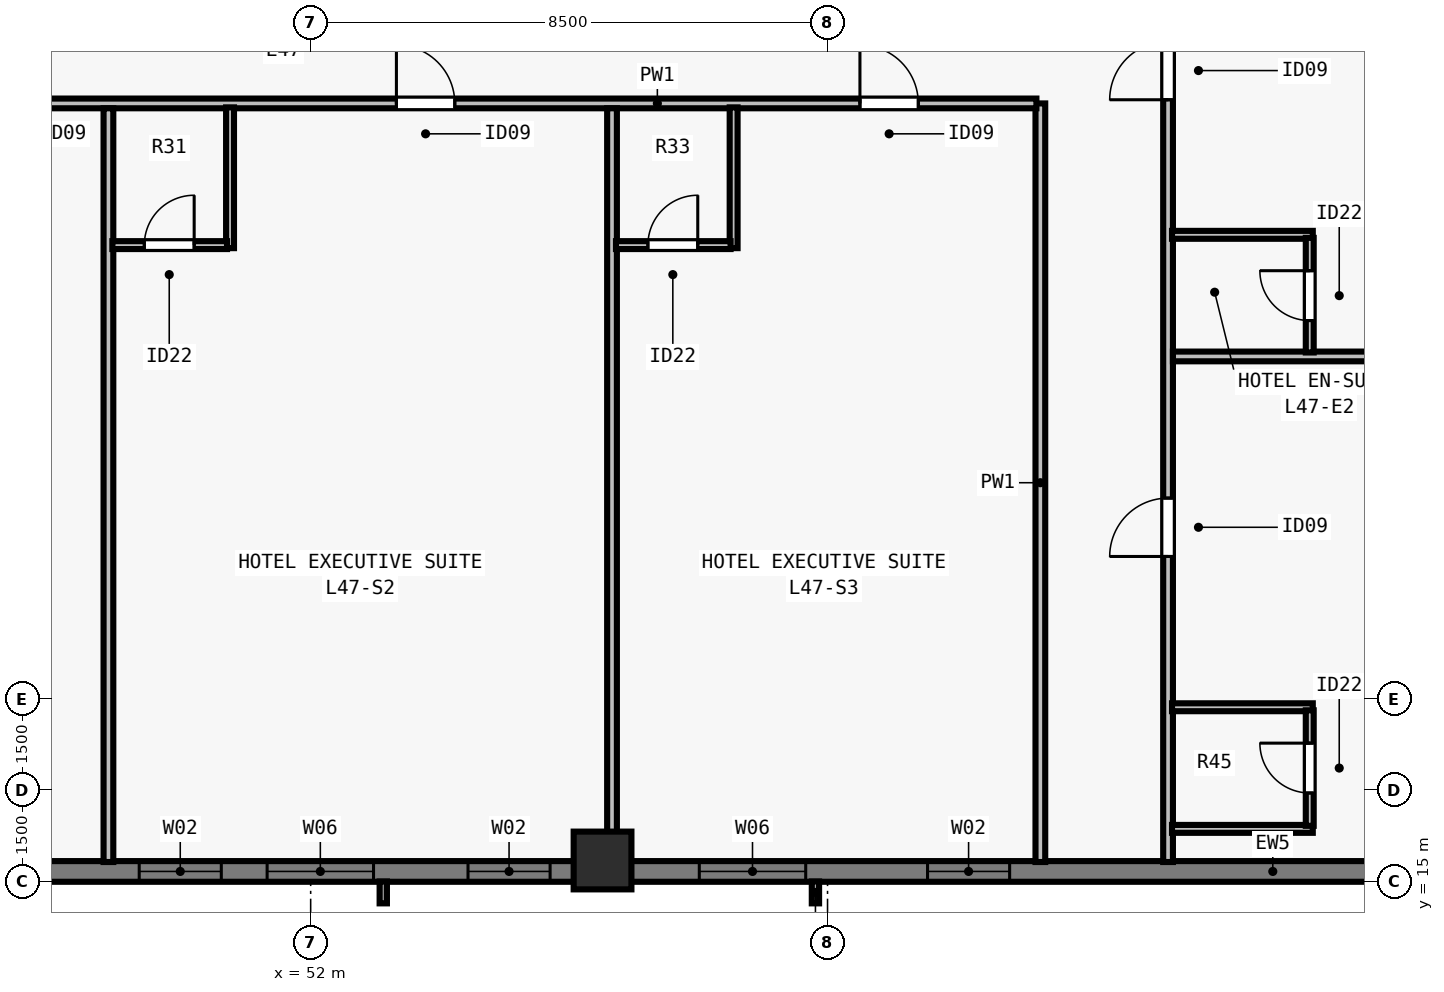
"""IFC4 building model, lengths in metres.
Left out: names, types, materials, properties, quantities, classifications, styles, units other than length and angle.
Written with IfcOpenShell. Run it as: python <this file> out.ifc"""

import sys

from ifc_helpers import new_model, si_unit, direction, frame, frame_2d, origin, origin_2d, place, context, subcontext, project, spatial, rectangle, extrude, element, fill, save


model = new_model("IFC4")
c1 = context("Model", 3, precision=1e-05, world=origin(), true_north=direction((0.0, 1.0)))
c2 = subcontext(c1, "Body", "Model", "MODEL_VIEW")
j1 = project(units=[si_unit("LENGTHUNIT", "METRE"), si_unit("PLANEANGLEUNIT", "RADIAN")], contexts=[c1])
p1 = place(None, origin())
s1 = spatial("IfcSite", under=j1, at=p1, CompositionType="ELEMENT")
p2 = place(p1, origin())
s2 = spatial("IfcBuilding", under=s1, at=p2, CompositionType="ELEMENT")
p3 = place(p2, frame((0.0, 0.0, 172.5)))
s3 = spatial("IfcBuildingStorey", under=s2, at=p3, CompositionType="ELEMENT", Elevation=172.5)
p4 = place(p3, frame((56.8, 15.35, 0.0), z_axis=(0.0, 0.0, 1.0), x_axis=(1.0, 0.0, 0.0)))
e1 = element("IfcColumn", 1, at=p4, inside=s3, PredefinedType="COLUMN", context=c2, shape_type="SweptSolid", body=[
    extrude(rectangle(XDim=0.95, YDim=0.95, at=origin_2d()), origin(), (0.0, 0.0, 1.0), 3.5),
])
p5 = place(p3, frame((72.0, 15.17, 0.0), z_axis=(0.0, 0.0, 1.0), x_axis=(-1.0, 0.0, 0.0)))
e2 = element("IfcWall", 2, at=p5, inside=s3, PredefinedType="SOLIDWALL", context=c2, shape_type="SweptSolid", body=[
    extrude(rectangle(XDim=39.682, YDim=0.34, at=frame_2d((19.841, 0.0))), origin(), (0.0, 0.0, 1.0), 3.28),
])
p6 = place(p5, frame((8.505, 0.0, 0.8)))
e3 = element("IfcOpeningElement", 3, at=p6, cuts=e2, PredefinedType="OPENING", context=c2, shape_type="SweptSolid", body=[
    extrude(rectangle(XDim=1.35, YDim=1.66, at=frame_2d((0.675, 0.83))), frame((0.0, 0.18, 0.0), z_axis=(0.0, -1.0, 0.0), x_axis=(1.0, 0.0, 0.0)), (0.0, 0.0, 1.0), 0.36),
])
p7 = place(p5, frame((11.859, 0.0, 0.8)))
e4 = element("IfcOpeningElement", 4, at=p7, cuts=e2, PredefinedType="OPENING", context=c2, shape_type="SweptSolid", body=[
    extrude(rectangle(XDim=1.75, YDim=1.66, at=frame_2d((0.875, 0.83))), frame((0.0, 0.18, 0.0), z_axis=(0.0, -1.0, 0.0), x_axis=(1.0, 0.0, 0.0)), (0.0, 0.0, 1.0), 0.36),
])
p8 = place(p5, frame((16.062, 0.0, 0.8)))
e5 = element("IfcOpeningElement", 5, at=p8, cuts=e2, PredefinedType="OPENING", context=c2, shape_type="SweptSolid", body=[
    extrude(rectangle(XDim=1.35, YDim=1.66, at=frame_2d((0.675, 0.83))), frame((0.0, 0.18, 0.0), z_axis=(0.0, -1.0, 0.0), x_axis=(1.0, 0.0, 0.0)), (0.0, 0.0, 1.0), 0.36),
])
p9 = place(p5, frame((18.966, 0.0, 0.8)))
e6 = element("IfcOpeningElement", 6, at=p9, cuts=e2, PredefinedType="OPENING", context=c2, shape_type="SweptSolid", body=[
    extrude(rectangle(XDim=1.75, YDim=1.66, at=frame_2d((0.875, 0.83))), frame((0.0, 0.18, 0.0), z_axis=(0.0, -1.0, 0.0), x_axis=(1.0, 0.0, 0.0)), (0.0, 0.0, 1.0), 0.36),
])
p10 = place(p5, frame((21.469, 0.0, 0.8)))
e7 = element("IfcOpeningElement", 7, at=p10, cuts=e2, PredefinedType="OPENING", context=c2, shape_type="SweptSolid", body=[
    extrude(rectangle(XDim=1.35, YDim=1.66, at=frame_2d((0.675, 0.83))), frame((0.0, 0.18, 0.0), z_axis=(0.0, -1.0, 0.0), x_axis=(1.0, 0.0, 0.0)), (0.0, 0.0, 1.0), 0.36),
])
p11 = place(p5, frame((26.073, 0.0, 0.8)))
e8 = element("IfcOpeningElement", 8, at=p11, cuts=e2, PredefinedType="OPENING", context=c2, shape_type="SweptSolid", body=[
    extrude(rectangle(XDim=1.75, YDim=1.66, at=frame_2d((0.875, 0.83))), frame((0.0, 0.18, 0.0), z_axis=(0.0, -1.0, 0.0), x_axis=(1.0, 0.0, 0.0)), (0.0, 0.0, 1.0), 0.36),
])
p12 = place(p5, frame((32.71, 0.0, 0.8)))
e9 = element("IfcOpeningElement", 9, at=p12, cuts=e2, PredefinedType="OPENING", context=c2, shape_type="SweptSolid", body=[
    extrude(rectangle(XDim=0.9, YDim=1.66, at=frame_2d((0.45, 0.83))), frame((0.0, 0.18, 0.0), z_axis=(0.0, -1.0, 0.0), x_axis=(1.0, 0.0, 0.0)), (0.0, 0.0, 1.0), 0.36),
])
p13 = place(p3, frame((66.1, 15.325, 0.0), z_axis=(0.0, 0.0, 1.0), x_axis=(0.0, 1.0, 0.0)))
e10 = element("IfcWall", 10, at=p13, inside=s3, PredefinedType="PARTITIONING", context=c2, shape_type="SweptSolid", body=[
    extrude(rectangle(XDim=47.35, YDim=0.16, at=frame_2d((23.675, 0.0))), origin(), (0.0, 0.0, 1.0), 2.555),
])
p14 = place(p13, frame((5.025, 0.0, 0.0)))
e11 = element("IfcOpeningElement", 11, at=p14, cuts=e10, PredefinedType="OPENING", context=c2, shape_type="SweptSolid", body=[
    extrude(rectangle(XDim=0.96, YDim=2.15, at=frame_2d((0.48, 1.075))), frame((0.0, 0.09, 0.0), z_axis=(0.0, -1.0, 0.0), x_axis=(1.0, 0.0, 0.0)), (0.0, 0.0, 1.0), 0.18),
])
p15 = place(p13, frame((12.535, 0.0, 0.0)))
e12 = element("IfcOpeningElement", 12, at=p15, cuts=e10, PredefinedType="OPENING", context=c2, shape_type="SweptSolid", body=[
    extrude(rectangle(XDim=0.96, YDim=2.15, at=frame_2d((0.48, 1.075))), frame((0.0, 0.09, 0.0), z_axis=(0.0, -1.0, 0.0), x_axis=(1.0, 0.0, 0.0)), (0.0, 0.0, 1.0), 0.18),
])
p16 = place(p13, frame((20.395, 0.0, 0.0)))
e13 = element("IfcOpeningElement", 13, at=p16, cuts=e10, PredefinedType="OPENING", context=c2, shape_type="SweptSolid", body=[
    extrude(rectangle(XDim=0.96, YDim=2.15, at=frame_2d((0.48, 1.075))), frame((0.0, 0.09, 0.0), z_axis=(0.0, -1.0, 0.0), x_axis=(1.0, 0.0, 0.0)), (0.0, 0.0, 1.0), 0.18),
])
p17 = place(p13, frame((28.255, 0.0, 0.0)))
e14 = element("IfcOpeningElement", 14, at=p17, cuts=e10, PredefinedType="OPENING", context=c2, shape_type="SweptSolid", body=[
    extrude(rectangle(XDim=0.96, YDim=2.15, at=frame_2d((0.48, 1.075))), frame((0.0, 0.09, 0.0), z_axis=(0.0, -1.0, 0.0), x_axis=(1.0, 0.0, 0.0)), (0.0, 0.0, 1.0), 0.18),
])
p18 = place(p13, frame((36.115, 0.0, 0.0)))
e15 = element("IfcOpeningElement", 15, at=p18, cuts=e10, PredefinedType="OPENING", context=c2, shape_type="SweptSolid", body=[
    extrude(rectangle(XDim=0.96, YDim=2.15, at=frame_2d((0.48, 1.075))), frame((0.0, 0.09, 0.0), z_axis=(0.0, -1.0, 0.0), x_axis=(1.0, 0.0, 0.0)), (0.0, 0.0, 1.0), 0.18),
])
p19 = place(p13, frame((44.1, 0.0, 0.0)))
e16 = element("IfcOpeningElement", 16, at=p19, cuts=e10, PredefinedType="OPENING", context=c2, shape_type="SweptSolid", body=[
    extrude(rectangle(XDim=0.96, YDim=2.15, at=frame_2d((0.48, 1.075))), frame((0.0, 0.09, 0.0), z_axis=(0.0, -1.0, 0.0), x_axis=(1.0, 0.0, 0.0)), (0.0, 0.0, 1.0), 0.18),
])
p20 = place(p3, frame((64.0, 15.325, 0.0), z_axis=(0.0, 0.0, 1.0), x_axis=(0.0, 1.0, 0.0)))
e17 = element("IfcWall", 17, at=p20, inside=s3, PredefinedType="PARTITIONING", context=c2, shape_type="SweptSolid", body=[
    extrude(rectangle(XDim=12.475, YDim=0.16, at=frame_2d((6.238, 0.0))), origin(), (0.0, 0.0, 1.0), 2.555),
])
p21 = place(p3, frame((41.865, 27.8, 0.0), z_axis=(0.0, 0.0, 1.0), x_axis=(1.0, 0.0, 0.0)))
e18 = element("IfcWall", 18, at=p21, inside=s3, PredefinedType="PARTITIONING", context=c2, shape_type="SweptSolid", body=[
    extrude(rectangle(XDim=22.07, YDim=0.16, at=frame_2d((11.035, 0.0))), origin(), (0.0, 0.0, 1.0), 3.28),
])
p22 = place(p21, frame((4.232, 0.0, 0.0)))
e19 = element("IfcOpeningElement", 19, at=p22, cuts=e18, PredefinedType="OPENING", context=c2, shape_type="SweptSolid", body=[
    extrude(rectangle(XDim=0.96, YDim=2.15, at=frame_2d((0.48, 1.075))), frame((0.0, 0.09, 0.0), z_axis=(0.0, -1.0, 0.0), x_axis=(1.0, 0.0, 0.0)), (0.0, 0.0, 1.0), 0.18),
])
p23 = place(p21, frame((11.545, 0.0, 0.0)))
e20 = element("IfcOpeningElement", 20, at=p23, cuts=e18, PredefinedType="OPENING", context=c2, shape_type="SweptSolid", body=[
    extrude(rectangle(XDim=0.96, YDim=2.15, at=frame_2d((0.48, 1.075))), frame((0.0, 0.09, 0.0), z_axis=(0.0, -1.0, 0.0), x_axis=(1.0, 0.0, 0.0)), (0.0, 0.0, 1.0), 0.18),
])
p24 = place(p21, frame((19.168, 0.0, 0.0)))
e21 = element("IfcOpeningElement", 21, at=p24, cuts=e18, PredefinedType="OPENING", context=c2, shape_type="SweptSolid", body=[
    extrude(rectangle(XDim=0.96, YDim=2.15, at=frame_2d((0.48, 1.075))), frame((0.0, 0.09, 0.0), z_axis=(0.0, -1.0, 0.0), x_axis=(1.0, 0.0, 0.0)), (0.0, 0.0, 1.0), 0.18),
])
p25 = place(p3, frame((48.674, 15.325, 0.0), z_axis=(0.0, 0.0, 1.0), x_axis=(0.0, 1.0, 0.0)))
e22 = element("IfcWall", 22, at=p25, inside=s3, PredefinedType="PARTITIONING", context=c2, shape_type="SweptSolid", body=[
    extrude(rectangle(XDim=12.395, YDim=0.16, at=frame_2d((6.198, 0.0))), origin(), (0.0, 0.0, 1.0), 2.896),
])
p26 = place(p3, frame((50.674, 25.42, 0.0), z_axis=(0.0, 0.0, 1.0), x_axis=(0.0, 1.0, 0.0)))
e23 = element("IfcWall", 23, at=p26, inside=s3, PredefinedType="PLUMBINGWALL", context=c2, shape_type="SweptSolid", body=[
    extrude(rectangle(XDim=2.315, YDim=0.13, at=frame_2d((1.158, 0.0))), origin(), (0.0, 0.0, 1.0), 3.28),
])
p27 = place(p3, frame((48.739, 25.47, 0.0), z_axis=(0.0, 0.0, 1.0), x_axis=(1.0, 0.0, 0.0)))
e24 = element("IfcWall", 24, at=p27, inside=s3, PredefinedType="PLUMBINGWALL", context=c2, shape_type="SweptSolid", body=[
    extrude(rectangle(XDim=1.885, YDim=0.13, at=frame_2d((0.942, 0.0))), origin(), (0.0, 0.0, 1.0), 3.28),
])
p28 = place(p27, frame((0.525, 0.0, 0.0)))
e25 = element("IfcOpeningElement", 25, at=p28, cuts=e24, PredefinedType="OPENING", context=c2, shape_type="SweptSolid", body=[
    extrude(rectangle(XDim=0.82, YDim=2.1, at=frame_2d((0.41, 1.05))), frame((0.0, 0.075, 0.0), z_axis=(0.0, -1.0, 0.0), x_axis=(1.0, 0.0, 0.0)), (0.0, 0.0, 1.0), 0.15),
])
p29 = place(p3, frame((56.956, 15.325, 0.0), z_axis=(0.0, 0.0, 1.0), x_axis=(0.0, 1.0, 0.0)))
e26 = element("IfcWall", 26, at=p29, inside=s3, PredefinedType="PARTITIONING", context=c2, shape_type="SweptSolid", body=[
    extrude(rectangle(XDim=12.395, YDim=0.16, at=frame_2d((6.198, 0.0))), origin(), (0.0, 0.0, 1.0), 2.555),
])
p30 = place(p3, frame((58.956, 25.42, 0.0), z_axis=(0.0, 0.0, 1.0), x_axis=(0.0, 1.0, 0.0)))
e27 = element("IfcWall", 27, at=p30, inside=s3, PredefinedType="PLUMBINGWALL", context=c2, shape_type="SweptSolid", body=[
    extrude(rectangle(XDim=2.315, YDim=0.13, at=frame_2d((1.158, 0.0))), origin(), (0.0, 0.0, 1.0), 3.28),
])
p31 = place(p3, frame((57.021, 25.47, 0.0), z_axis=(0.0, 0.0, 1.0), x_axis=(1.0, 0.0, 0.0)))
e28 = element("IfcWall", 28, at=p31, inside=s3, PredefinedType="PLUMBINGWALL", context=c2, shape_type="SweptSolid", body=[
    extrude(rectangle(XDim=1.885, YDim=0.13, at=frame_2d((0.942, 0.0))), origin(), (0.0, 0.0, 1.0), 3.28),
])
p32 = place(p31, frame((0.525, 0.0, 0.0)))
e29 = element("IfcOpeningElement", 29, at=p32, cuts=e28, PredefinedType="OPENING", context=c2, shape_type="SweptSolid", body=[
    extrude(rectangle(XDim=0.82, YDim=2.1, at=frame_2d((0.41, 1.05))), frame((0.0, 0.075, 0.0), z_axis=(0.0, -1.0, 0.0), x_axis=(1.0, 0.0, 0.0)), (0.0, 0.0, 1.0), 0.15),
])
for number, where, z_axis, x_axis in (
    (30, (66.165, 15.87, 0.0), (0.0, 0.0, 1.0), (1.0, 0.0, 0.0)),
    (31, (66.165, 17.87, 0.0), (0.0, 0.0, 1.0), (1.0, 0.0, 0.0)),
):
    element("IfcWall", number, at=place(p3, frame(where, z_axis=z_axis, x_axis=x_axis)), inside=s3, PredefinedType="PLUMBINGWALL", context=c2, shape_type="SweptSolid", body=[
        extrude(rectangle(XDim=2.315, YDim=0.13, at=frame_2d((1.157, 0.0))), origin(), (0.0, 0.0, 1.0), 3.28),
    ])
p33 = place(p3, frame((68.43, 15.92, 0.0), z_axis=(0.0, 0.0, 1.0), x_axis=(0.0, 1.0, 0.0)))
e32 = element("IfcWall", 32, at=p33, inside=s3, PredefinedType="PLUMBINGWALL", context=c2, shape_type="SweptSolid", body=[
    extrude(rectangle(XDim=1.9, YDim=0.13, at=frame_2d((0.95, 0.0))), origin(), (0.0, 0.0, 1.0), 3.28),
])
p34 = place(p33, frame((0.54, 0.0, 0.0)))
e33 = element("IfcOpeningElement", 33, at=p34, cuts=e32, PredefinedType="OPENING", context=c2, shape_type="SweptSolid", body=[
    extrude(rectangle(XDim=0.82, YDim=2.1, at=frame_2d((0.41, 1.05))), frame((0.0, 0.075, 0.0), z_axis=(0.0, -1.0, 0.0), x_axis=(1.0, 0.0, 0.0)), (0.0, 0.0, 1.0), 0.15),
])
p35 = place(p3, frame((66.18, 23.639, 0.0), z_axis=(0.0, 0.0, 1.0), x_axis=(1.0, 0.0, 0.0)))
e34 = element("IfcWall", 34, at=p35, inside=s3, PredefinedType="PARTITIONING", context=c2, shape_type="SweptSolid", body=[
    extrude(rectangle(XDim=9.495, YDim=0.16, at=frame_2d((4.748, 0.0))), origin(), (0.0, 0.0, 1.0), 2.896),
])
p36 = place(p3, frame((66.165, 25.639, 0.0), z_axis=(0.0, 0.0, 1.0), x_axis=(1.0, 0.0, 0.0)))
e35 = element("IfcWall", 35, at=p36, inside=s3, PredefinedType="PLUMBINGWALL", context=c2, shape_type="SweptSolid", body=[
    extrude(rectangle(XDim=2.315, YDim=0.13, at=frame_2d((1.157, 0.0))), origin(), (0.0, 0.0, 1.0), 2.896),
])
p37 = place(p3, frame((68.43, 23.704, 0.0), z_axis=(0.0, 0.0, 1.0), x_axis=(0.0, 1.0, 0.0)))
e36 = element("IfcWall", 36, at=p37, inside=s3, PredefinedType="PLUMBINGWALL", context=c2, shape_type="SweptSolid", body=[
    extrude(rectangle(XDim=1.885, YDim=0.13, at=frame_2d((0.942, 0.0))), origin(), (0.0, 0.0, 1.0), 3.28),
])
p38 = place(p37, frame((0.525, 0.0, 0.0)))
e37 = element("IfcOpeningElement", 37, at=p38, cuts=e36, PredefinedType="OPENING", context=c2, shape_type="SweptSolid", body=[
    extrude(rectangle(XDim=0.82, YDim=2.1, at=frame_2d((0.41, 1.05))), frame((0.0, 0.075, 0.0), z_axis=(0.0, -1.0, 0.0), x_axis=(1.0, 0.0, 0.0)), (0.0, 0.0, 1.0), 0.15),
])
p39 = place(p6, origin())
e38 = element("IfcWindow", 38, at=p39, inside=s3, PartitioningType="SINGLE_PANEL", PredefinedType="WINDOW", context=c2, shape_type="SweptSolid", body=[
    extrude(rectangle(XDim=1.35, YDim=1.66, at=frame_2d((0.675, 0.83))), frame((0.0, -0.05, 0.0), z_axis=(0.0, -1.0, 0.0), x_axis=(1.0, 0.0, 0.0)), (0.0, 0.0, 1.0), 0.06),
])
fill(e3, e38)
p40 = place(p7, origin())
e39 = element("IfcWindow", 39, at=p40, inside=s3, PartitioningType="SINGLE_PANEL", PredefinedType="WINDOW", context=c2, shape_type="SweptSolid", body=[
    extrude(rectangle(XDim=1.75, YDim=1.66, at=frame_2d((0.875, 0.83))), frame((0.0, -0.05, 0.0), z_axis=(0.0, -1.0, 0.0), x_axis=(1.0, 0.0, 0.0)), (0.0, 0.0, 1.0), 0.06),
])
fill(e4, e39)
p41 = place(p8, origin())
e40 = element("IfcWindow", 40, at=p41, inside=s3, PartitioningType="SINGLE_PANEL", PredefinedType="WINDOW", context=c2, shape_type="SweptSolid", body=[
    extrude(rectangle(XDim=1.35, YDim=1.66, at=frame_2d((0.675, 0.83))), frame((0.0, -0.05, 0.0), z_axis=(0.0, -1.0, 0.0), x_axis=(1.0, 0.0, 0.0)), (0.0, 0.0, 1.0), 0.06),
])
fill(e5, e40)
p42 = place(p9, origin())
e41 = element("IfcWindow", 41, at=p42, inside=s3, PartitioningType="SINGLE_PANEL", PredefinedType="WINDOW", context=c2, shape_type="SweptSolid", body=[
    extrude(rectangle(XDim=1.75, YDim=1.66, at=frame_2d((0.875, 0.83))), frame((0.0, -0.05, 0.0), z_axis=(0.0, -1.0, 0.0), x_axis=(1.0, 0.0, 0.0)), (0.0, 0.0, 1.0), 0.06),
])
fill(e6, e41)
p43 = place(p10, origin())
e42 = element("IfcWindow", 42, at=p43, inside=s3, PartitioningType="SINGLE_PANEL", PredefinedType="WINDOW", context=c2, shape_type="SweptSolid", body=[
    extrude(rectangle(XDim=1.35, YDim=1.66, at=frame_2d((0.675, 0.83))), frame((0.0, -0.05, 0.0), z_axis=(0.0, -1.0, 0.0), x_axis=(1.0, 0.0, 0.0)), (0.0, 0.0, 1.0), 0.06),
])
fill(e7, e42)
p44 = place(p28, origin())
e43 = element("IfcDoor", 43, at=p44, inside=s3, OperationType="SINGLE_SWING_RIGHT", PredefinedType="DOOR", context=c2, shape_type="SweptSolid", body=[
    extrude(rectangle(XDim=0.82, YDim=2.1, at=frame_2d((0.41, 1.05))), frame((0.0, 0.025, 0.0), z_axis=(0.0, -1.0, 0.0), x_axis=(1.0, 0.0, 0.0)), (0.0, 0.0, 1.0), 0.05),
])
fill(e25, e43)
p45 = place(p23, origin())
e44 = element("IfcDoor", 44, at=p45, inside=s3, OperationType="SINGLE_SWING_LEFT", PredefinedType="DOOR", context=c2, shape_type="SweptSolid", body=[
    extrude(rectangle(XDim=0.96, YDim=2.15, at=frame_2d((0.48, 1.075))), frame((0.0, 0.025, 0.0), z_axis=(0.0, -1.0, 0.0), x_axis=(1.0, 0.0, 0.0)), (0.0, 0.0, 1.0), 0.05),
])
fill(e20, e44)
p46 = place(p32, origin())
e45 = element("IfcDoor", 45, at=p46, inside=s3, OperationType="SINGLE_SWING_RIGHT", PredefinedType="DOOR", context=c2, shape_type="SweptSolid", body=[
    extrude(rectangle(XDim=0.82, YDim=2.1, at=frame_2d((0.41, 1.05))), frame((0.0, 0.025, 0.0), z_axis=(0.0, -1.0, 0.0), x_axis=(1.0, 0.0, 0.0)), (0.0, 0.0, 1.0), 0.05),
])
fill(e29, e45)
p47 = place(p24, origin())
e46 = element("IfcDoor", 46, at=p47, inside=s3, OperationType="SINGLE_SWING_LEFT", PredefinedType="DOOR", context=c2, shape_type="SweptSolid", body=[
    extrude(rectangle(XDim=0.96, YDim=2.15, at=frame_2d((0.48, 1.075))), frame((0.0, 0.025, 0.0), z_axis=(0.0, -1.0, 0.0), x_axis=(1.0, 0.0, 0.0)), (0.0, 0.0, 1.0), 0.05),
])
fill(e21, e46)
p48 = place(p34, origin())
e47 = element("IfcDoor", 47, at=p48, inside=s3, OperationType="SINGLE_SWING_RIGHT", PredefinedType="DOOR", context=c2, shape_type="SweptSolid", body=[
    extrude(rectangle(XDim=0.82, YDim=2.1, at=frame_2d((0.41, 1.05))), frame((0.0, 0.025, 0.0), z_axis=(0.0, -1.0, 0.0), x_axis=(1.0, 0.0, 0.0)), (0.0, 0.0, 1.0), 0.05),
])
fill(e33, e47)
p49 = place(p14, origin())
e48 = element("IfcDoor", 48, at=p49, inside=s3, OperationType="SINGLE_SWING_LEFT", PredefinedType="DOOR", context=c2, shape_type="SweptSolid", body=[
    extrude(rectangle(XDim=0.96, YDim=2.15, at=frame_2d((0.48, 1.075))), frame((0.0, 0.025, 0.0), z_axis=(0.0, -1.0, 0.0), x_axis=(1.0, 0.0, 0.0)), (0.0, 0.0, 1.0), 0.05),
])
fill(e11, e48)
p50 = place(p38, origin())
e49 = element("IfcDoor", 49, at=p50, inside=s3, OperationType="SINGLE_SWING_RIGHT", PredefinedType="DOOR", context=c2, shape_type="SweptSolid", body=[
    extrude(rectangle(XDim=0.82, YDim=2.1, at=frame_2d((0.41, 1.05))), frame((0.0, 0.025, 0.0), z_axis=(0.0, -1.0, 0.0), x_axis=(1.0, 0.0, 0.0)), (0.0, 0.0, 1.0), 0.05),
])
fill(e37, e49)
p51 = place(p15, origin())
e50 = element("IfcDoor", 50, at=p51, inside=s3, OperationType="SINGLE_SWING_LEFT", PredefinedType="DOOR", context=c2, shape_type="SweptSolid", body=[
    extrude(rectangle(XDim=0.96, YDim=2.15, at=frame_2d((0.48, 1.075))), frame((0.0, 0.025, 0.0), z_axis=(0.0, -1.0, 0.0), x_axis=(1.0, 0.0, 0.0)), (0.0, 0.0, 1.0), 0.05),
])
fill(e12, e50)
save(model, sys.argv[1])
